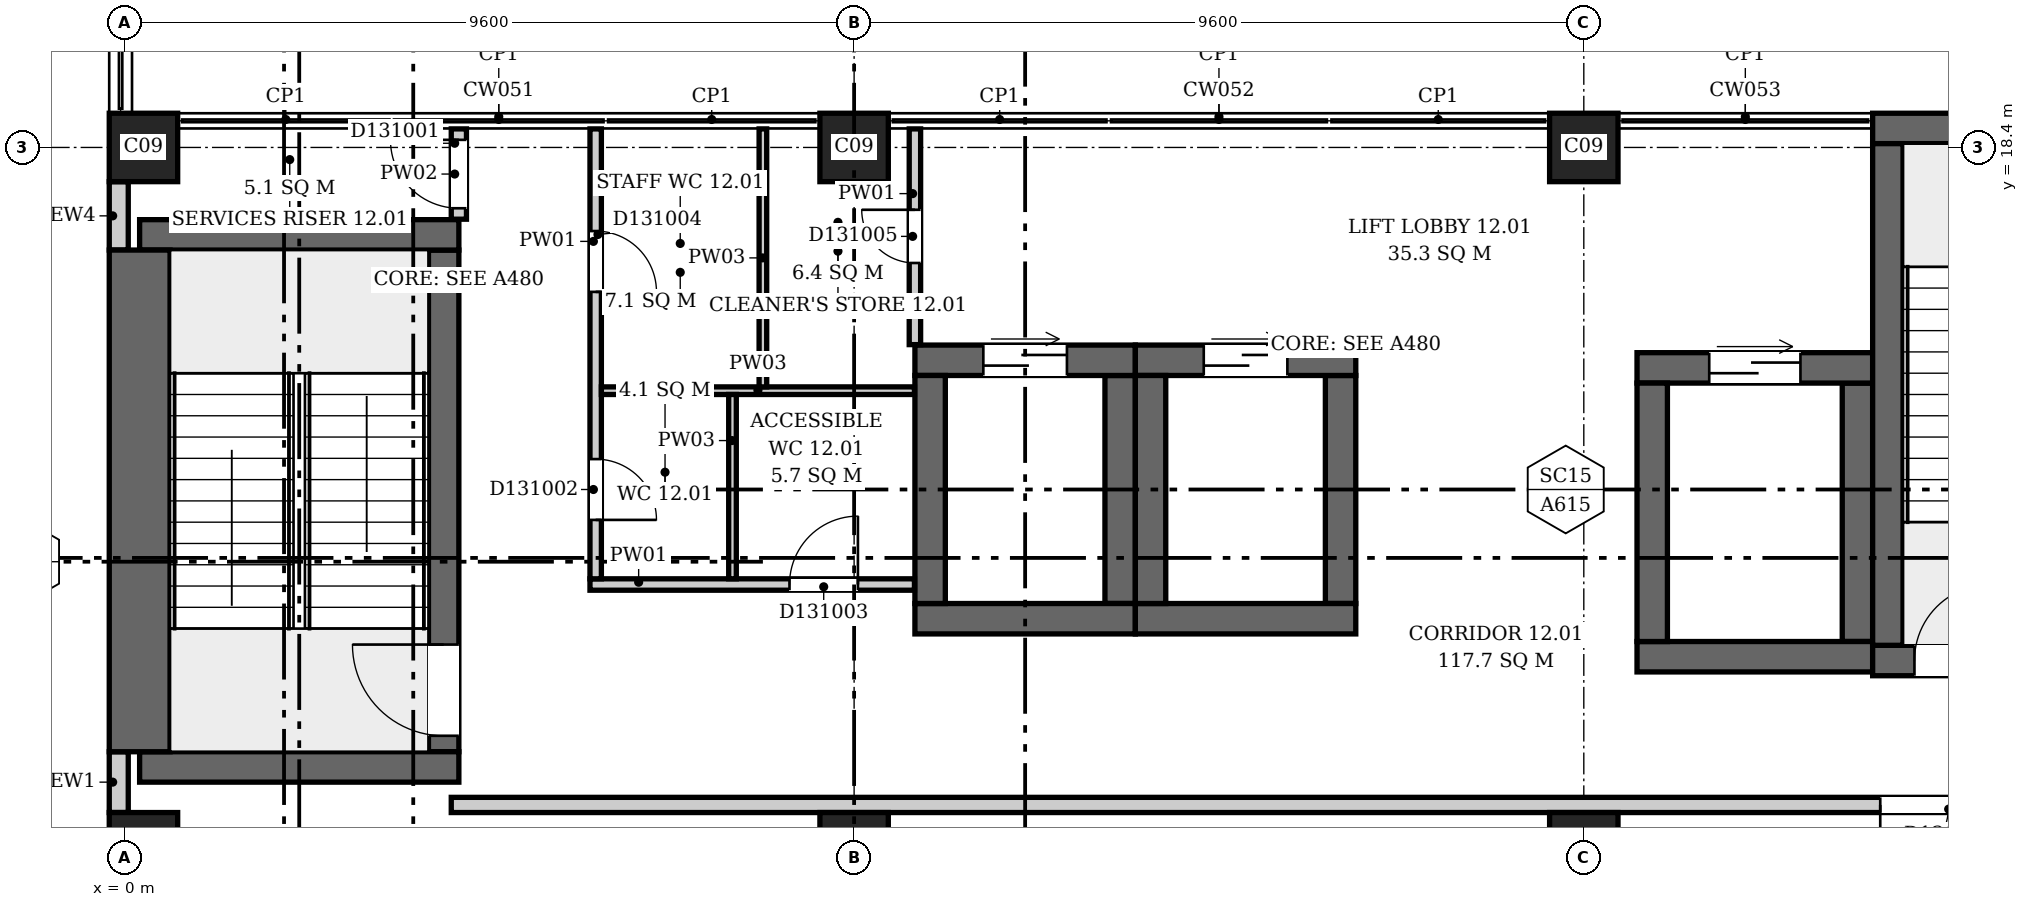
"""IFC4 building model, lengths in metres.
Left out: names, types, materials, properties, quantities, classifications, styles, units other than length and angle.
Written with IfcOpenShell. Run it as: python <this file> out.ifc"""

import sys

from ifc_helpers import new_model, si_unit, direction, frame, frame_2d, origin, origin_2d, place, context, subcontext, project, spatial, rectangle, extrude, element, fill, save


model = new_model("IFC4")
c1 = context("Model", 3, precision=1e-05, world=origin(), true_north=direction((0.0, 1.0)))
c2 = subcontext(c1, "Body", "Model", "MODEL_VIEW")
j1 = project(units=[si_unit("LENGTHUNIT", "METRE"), si_unit("PLANEANGLEUNIT", "RADIAN")], contexts=[c1])
p1 = place(None, origin())
s1 = spatial("IfcSite", under=j1, at=p1, CompositionType="ELEMENT")
p2 = place(p1, origin())
s2 = spatial("IfcBuilding", under=s1, at=p2, CompositionType="ELEMENT")
p3 = place(p2, frame((0.0, 0.0, 61.3)))
s3 = spatial("IfcBuildingStorey", under=s2, at=p3, CompositionType="ELEMENT", Elevation=61.3)
for number, where, z_axis, x_axis in (
    (1, (0.2, 10.25, 0.0), (0.0, 0.0, 1.0), (1.0, 0.0, 0.0)),
    (2, (0.2, 17.25, 0.0), (0.0, 0.0, 1.0), (1.0, 0.0, 0.0)),
):
    element("IfcWall", number, at=place(p3, frame(where, z_axis=z_axis, x_axis=x_axis)), inside=s3, PredefinedType="SHEAR", context=c2, shape_type="SweptSolid", body=[
        extrude(rectangle(XDim=4.2, YDim=0.4, at=frame_2d((2.1, 0.0))), origin(), (0.0, 0.0, 1.0), 4.2),
    ])
p4 = place(p3, frame((0.2, 10.45, 0.0), z_axis=(0.0, 0.0, 1.0), x_axis=(0.0, 1.0, 0.0)))
e3 = element("IfcWall", 3, at=p4, inside=s3, PredefinedType="SHEAR", context=c2, shape_type="SweptSolid", body=[
    extrude(rectangle(XDim=6.6, YDim=0.8, at=frame_2d((3.3, 0.0))), origin(), (0.0, 0.0, 1.0), 4.2),
])
p5 = place(p3, frame((4.2, 10.45, 0.0), z_axis=(0.0, 0.0, 1.0), x_axis=(0.0, 1.0, 0.0)))
e4 = element("IfcWall", 4, at=p5, inside=s3, PredefinedType="SHEAR", context=c2, shape_type="SweptSolid", body=[
    extrude(rectangle(XDim=6.6, YDim=0.4, at=frame_2d((3.3, 0.0))), origin(), (0.0, 0.0, 1.0), 4.2),
])
p6 = place(p5, frame((0.21, 0.0, 0.0)))
e5 = element("IfcOpeningElement", 5, at=p6, cuts=e4, PredefinedType="OPENING", context=c2, shape_type="SweptSolid", body=[
    extrude(rectangle(XDim=1.2, YDim=2.1, at=frame_2d((0.6, 1.05))), frame((0.0, 0.21, 0.0), z_axis=(0.0, -1.0, 0.0), x_axis=(1.0, 0.0, 0.0)), (0.0, 0.0, 1.0), 0.42),
])
p7 = place(p3, frame((23.0, 11.65, 0.0), z_axis=(0.0, 0.0, 1.0), x_axis=(1.0, 0.0, 0.0)))
e6 = element("IfcWall", 6, at=p7, inside=s3, PredefinedType="SHEAR", context=c2, shape_type="SweptSolid", body=[
    extrude(rectangle(XDim=4.2, YDim=0.4, at=frame_2d((2.1, 0.0))), origin(), (0.0, 0.0, 1.0), 4.2),
])
p8 = place(p7, frame((0.55, 0.0, 0.0)))
e7 = element("IfcOpeningElement", 7, at=p8, cuts=e6, PredefinedType="OPENING", context=c2, shape_type="SweptSolid", body=[
    extrude(rectangle(XDim=1.0, YDim=2.1, at=frame_2d((0.5, 1.05))), frame((0.0, 0.21, 0.0), z_axis=(0.0, -1.0, 0.0), x_axis=(1.0, 0.0, 0.0)), (0.0, 0.0, 1.0), 0.42),
])
p9 = place(p7, frame((2.65, 0.0, 0.0)))
e8 = element("IfcOpeningElement", 8, at=p9, cuts=e6, PredefinedType="OPENING", context=c2, shape_type="SweptSolid", body=[
    extrude(rectangle(XDim=1.0, YDim=2.1, at=frame_2d((0.5, 1.05))), frame((0.0, 0.21, 0.0), z_axis=(0.0, -1.0, 0.0), x_axis=(1.0, 0.0, 0.0)), (0.0, 0.0, 1.0), 0.42),
])
p10 = place(p3, frame((23.0, 18.65, 0.0), z_axis=(0.0, 0.0, 1.0), x_axis=(1.0, 0.0, 0.0)))
e9 = element("IfcWall", 9, at=p10, inside=s3, PredefinedType="SHEAR", context=c2, shape_type="SweptSolid", body=[
    extrude(rectangle(XDim=4.2, YDim=0.4, at=frame_2d((2.1, 0.0))), origin(), (0.0, 0.0, 1.0), 4.2),
])
p11 = place(p3, frame((23.2, 11.85, 0.0), z_axis=(0.0, 0.0, 1.0), x_axis=(0.0, 1.0, 0.0)))
e10 = element("IfcWall", 10, at=p11, inside=s3, PredefinedType="SHEAR", context=c2, shape_type="SweptSolid", body=[
    extrude(rectangle(XDim=6.6, YDim=0.4, at=frame_2d((3.3, 0.0))), origin(), (0.0, 0.0, 1.0), 4.2),
])
p12 = place(p3, frame((10.4, 12.2, 0.0), z_axis=(0.0, 0.0, 1.0), x_axis=(1.0, 0.0, 0.0)))
e11 = element("IfcWall", 11, at=p12, inside=s3, PredefinedType="SHEAR", context=c2, shape_type="SweptSolid", body=[
    extrude(rectangle(XDim=2.9, YDim=0.4, at=frame_2d((1.45, 0.0))), origin(), (0.0, 0.0, 1.0), 4.2),
])
p13 = place(p3, frame((10.4, 15.6, 0.0), z_axis=(0.0, 0.0, 1.0), x_axis=(1.0, 0.0, 0.0)))
e12 = element("IfcWall", 12, at=p13, inside=s3, PredefinedType="SHEAR", context=c2, shape_type="SweptSolid", body=[
    extrude(rectangle(XDim=2.9, YDim=0.4, at=frame_2d((1.45, 0.0))), origin(), (0.0, 0.0, 1.0), 4.2),
])
p14 = place(p13, frame((0.9, 0.0, 0.0)))
e13 = element("IfcOpeningElement", 13, at=p14, cuts=e12, PredefinedType="OPENING", context=c2, shape_type="SweptSolid", body=[
    extrude(rectangle(XDim=1.1, YDim=2.1, at=frame_2d((0.55, 1.05))), frame((0.0, 0.21, 0.0), z_axis=(0.0, -1.0, 0.0), x_axis=(1.0, 0.0, 0.0)), (0.0, 0.0, 1.0), 0.42),
])
for number, where, z_axis, x_axis in (
    (14, (10.6, 12.4, 0.0), (0.0, 0.0, 1.0), (0.0, 1.0, 0.0)),
    (15, (13.1, 12.4, 0.0), (0.0, 0.0, 1.0), (0.0, 1.0, 0.0)),
):
    element("IfcWall", number, at=place(p3, frame(where, z_axis=z_axis, x_axis=x_axis)), inside=s3, PredefinedType="SHEAR", context=c2, shape_type="SweptSolid", body=[
        extrude(rectangle(XDim=3.0, YDim=0.4, at=frame_2d((1.5, 0.0))), origin(), (0.0, 0.0, 1.0), 4.2),
    ])
p15 = place(p3, frame((13.3, 12.2, 0.0), z_axis=(0.0, 0.0, 1.0), x_axis=(1.0, 0.0, 0.0)))
e16 = element("IfcWall", 16, at=p15, inside=s3, PredefinedType="SHEAR", context=c2, shape_type="SweptSolid", body=[
    extrude(rectangle(XDim=2.9, YDim=0.4, at=frame_2d((1.45, 0.0))), origin(), (0.0, 0.0, 1.0), 4.2),
])
p16 = place(p3, frame((13.3, 15.6, 0.0), z_axis=(0.0, 0.0, 1.0), x_axis=(1.0, 0.0, 0.0)))
e17 = element("IfcWall", 17, at=p16, inside=s3, PredefinedType="SHEAR", context=c2, shape_type="SweptSolid", body=[
    extrude(rectangle(XDim=2.9, YDim=0.4, at=frame_2d((1.45, 0.0))), origin(), (0.0, 0.0, 1.0), 4.2),
])
p17 = place(p16, frame((0.9, 0.0, 0.0)))
e18 = element("IfcOpeningElement", 18, at=p17, cuts=e17, PredefinedType="OPENING", context=c2, shape_type="SweptSolid", body=[
    extrude(rectangle(XDim=1.1, YDim=2.1, at=frame_2d((0.55, 1.05))), frame((0.0, 0.21, 0.0), z_axis=(0.0, -1.0, 0.0), x_axis=(1.0, 0.0, 0.0)), (0.0, 0.0, 1.0), 0.42),
])
for number, where, z_axis, x_axis in (
    (19, (13.5, 12.4, 0.0), (0.0, 0.0, 1.0), (0.0, 1.0, 0.0)),
    (20, (16.0, 12.4, 0.0), (0.0, 0.0, 1.0), (0.0, 1.0, 0.0)),
):
    element("IfcWall", number, at=place(p3, frame(where, z_axis=z_axis, x_axis=x_axis)), inside=s3, PredefinedType="SHEAR", context=c2, shape_type="SweptSolid", body=[
        extrude(rectangle(XDim=3.0, YDim=0.4, at=frame_2d((1.5, 0.0))), origin(), (0.0, 0.0, 1.0), 4.2),
    ])
p18 = place(p3, frame((19.9, 11.7, 0.0), z_axis=(0.0, 0.0, 1.0), x_axis=(1.0, 0.0, 0.0)))
e21 = element("IfcWall", 21, at=p18, inside=s3, PredefinedType="SHEAR", context=c2, shape_type="SweptSolid", body=[
    extrude(rectangle(XDim=3.1, YDim=0.4, at=frame_2d((1.55, 0.0))), origin(), (0.0, 0.0, 1.0), 4.2),
])
p19 = place(p3, frame((19.9, 15.5, 0.0), z_axis=(0.0, 0.0, 1.0), x_axis=(1.0, 0.0, 0.0)))
e22 = element("IfcWall", 22, at=p19, inside=s3, PredefinedType="SHEAR", context=c2, shape_type="SweptSolid", body=[
    extrude(rectangle(XDim=3.1, YDim=0.4, at=frame_2d((1.55, 0.0))), origin(), (0.0, 0.0, 1.0), 4.2),
])
p20 = place(p19, frame((0.95, 0.0, 0.0)))
e23 = element("IfcOpeningElement", 23, at=p20, cuts=e22, PredefinedType="OPENING", context=c2, shape_type="SweptSolid", body=[
    extrude(rectangle(XDim=1.2, YDim=2.1, at=frame_2d((0.6, 1.05))), frame((0.0, 0.21, 0.0), z_axis=(0.0, -1.0, 0.0), x_axis=(1.0, 0.0, 0.0)), (0.0, 0.0, 1.0), 0.42),
])
for number, where, z_axis, x_axis in (
    (24, (20.1, 11.9, 0.0), (0.0, 0.0, 1.0), (0.0, 1.0, 0.0)),
    (25, (22.8, 11.9, 0.0), (0.0, 0.0, 1.0), (0.0, 1.0, 0.0)),
):
    element("IfcWall", number, at=place(p3, frame(where, z_axis=z_axis, x_axis=x_axis)), inside=s3, PredefinedType="SHEAR", context=c2, shape_type="SweptSolid", body=[
        extrude(rectangle(XDim=3.4, YDim=0.4, at=frame_2d((1.7, 0.0))), origin(), (0.0, 0.0, 1.0), 4.2),
    ])
for number, where, z_axis, x_axis in (
    (26, (0.25, 9.2, 0.0), (0.0, 0.0, 1.0), (1.0, 0.0, 0.0)),
    (27, (9.6, 9.2, 0.0), (0.0, 0.0, 1.0), (1.0, 0.0, 0.0)),
    (28, (19.2, 9.2, 0.0), (0.0, 0.0, 1.0), (1.0, 0.0, 0.0)),
    (29, (0.25, 18.4, 0.0), (0.0, 0.0, 1.0), (1.0, 0.0, 0.0)),
    (30, (9.6, 18.4, 0.0), (0.0, 0.0, 1.0), (1.0, 0.0, 0.0)),
    (31, (19.2, 18.4, 0.0), (0.0, 0.0, 1.0), (1.0, 0.0, 0.0)),
):
    element("IfcColumn", number, at=place(p3, frame(where, z_axis=z_axis, x_axis=x_axis)), inside=s3, PredefinedType="COLUMN", context=c2, shape_type="SweptSolid", body=[
        extrude(rectangle(XDim=0.9, YDim=0.9, at=origin_2d()), origin(), (0.0, 0.0, 1.0), 4.2),
    ])
p21 = place(p3, frame((-0.074, 10.45, 0.0), z_axis=(0.0, 0.0, 1.0), x_axis=(0.0, -1.0, 0.0)))
e32 = element("IfcWall", 32, at=p21, inside=s3, PredefinedType="ELEMENTEDWALL", context=c2, shape_type="SweptSolid", body=[
    extrude(rectangle(XDim=0.8, YDim=0.25, at=frame_2d((0.4, 0.0))), origin(), (0.0, 0.0, 1.0), 3.9),
])
p22 = place(p3, frame((-0.074, 17.95, 0.0), z_axis=(0.0, 0.0, 1.0), x_axis=(0.0, -1.0, 0.0)))
e33 = element("IfcWall", 33, at=p22, inside=s3, PredefinedType="ELEMENTEDWALL", context=c2, shape_type="SweptSolid", body=[
    extrude(rectangle(XDim=0.9, YDim=0.25, at=frame_2d((0.45, 0.0))), origin(), (0.0, 0.0, 1.0), 3.9),
])
p23 = place(p3, frame((4.3, 9.75, 0.0), z_axis=(0.0, 0.0, 1.0), x_axis=(1.0, 0.0, 0.0)))
e34 = element("IfcWall", 34, at=p23, inside=s3, PredefinedType="PARTITIONING", context=c2, shape_type="SweptSolid", body=[
    extrude(rectangle(XDim=43.894, YDim=0.2, at=frame_2d((21.947, 0.0))), origin(), (0.0, 0.0, 1.0), 3.9),
])
p24 = place(p23, frame((18.8, 0.0, 0.0)))
e35 = element("IfcOpeningElement", 35, at=p24, cuts=e34, PredefinedType="OPENING", context=c2, shape_type="SweptSolid", body=[
    extrude(rectangle(XDim=1.8, YDim=2.1, at=frame_2d((0.9, 1.05))), frame((0.0, 0.11, 0.0), z_axis=(0.0, -1.0, 0.0), x_axis=(1.0, 0.0, 0.0)), (0.0, 0.0, 1.0), 0.22),
])
p25 = place(p23, frame((28.7, 0.0, 0.0)))
e36 = element("IfcOpeningElement", 36, at=p25, cuts=e34, PredefinedType="OPENING", context=c2, shape_type="SweptSolid", body=[
    extrude(rectangle(XDim=1.2, YDim=2.1, at=frame_2d((0.6, 1.05))), frame((0.0, 0.11, 0.0), z_axis=(0.0, -1.0, 0.0), x_axis=(1.0, 0.0, 0.0)), (0.0, 0.0, 1.0), 0.22),
])
p26 = place(p23, frame((36.05, 0.0, 0.0)))
e37 = element("IfcOpeningElement", 37, at=p26, cuts=e34, PredefinedType="OPENING", context=c2, shape_type="SweptSolid", body=[
    extrude(rectangle(XDim=0.9, YDim=2.1, at=frame_2d((0.45, 1.05))), frame((0.0, 0.11, 0.0), z_axis=(0.0, -1.0, 0.0), x_axis=(1.0, 0.0, 0.0)), (0.0, 0.0, 1.0), 0.22),
])
p27 = place(p23, frame((40.8, 0.0, 0.0)))
e38 = element("IfcOpeningElement", 38, at=p27, cuts=e34, PredefinedType="OPENING", context=c2, shape_type="SweptSolid", body=[
    extrude(rectangle(XDim=1.2, YDim=2.1, at=frame_2d((0.6, 1.05))), frame((0.0, 0.11, 0.0), z_axis=(0.0, -1.0, 0.0), x_axis=(1.0, 0.0, 0.0)), (0.0, 0.0, 1.0), 0.22),
])
p28 = place(p3, frame((4.4, 17.456, 0.0), z_axis=(0.0, 0.0, 1.0), x_axis=(0.0, 1.0, 0.0)))
e39 = element("IfcWall", 39, at=p28, inside=s3, PredefinedType="PARTITIONING", context=c2, shape_type="SweptSolid", body=[
    extrude(rectangle(XDim=1.188, YDim=0.2, at=frame_2d((0.594, 0.0))), origin(), (0.0, 0.0, 1.0), 3.9),
])
p29 = place(p28, frame((0.144, 0.0, 0.0)))
e40 = element("IfcOpeningElement", 40, at=p29, cuts=e39, PredefinedType="OPENING", context=c2, shape_type="SweptSolid", body=[
    extrude(rectangle(XDim=0.9, YDim=2.1, at=frame_2d((0.45, 1.05))), frame((0.0, 0.11, 0.0), z_axis=(0.0, -1.0, 0.0), x_axis=(1.0, 0.0, 0.0)), (0.0, 0.0, 1.0), 0.22),
])
p30 = place(p3, frame((6.125, 12.65, 0.0), z_axis=(0.0, 0.0, 1.0), x_axis=(1.0, 0.0, 0.0)))
e41 = element("IfcWall", 41, at=p30, inside=s3, PredefinedType="PARTITIONING", context=c2, shape_type="SweptSolid", body=[
    extrude(rectangle(XDim=4.269, YDim=0.15, at=frame_2d((2.135, 0.0))), origin(), (0.0, 0.0, 1.0), 3.9),
])
p31 = place(p30, frame((2.625, 0.0, 0.0)))
e42 = element("IfcOpeningElement", 42, at=p31, cuts=e41, PredefinedType="OPENING", context=c2, shape_type="SweptSolid", body=[
    extrude(rectangle(XDim=0.9, YDim=2.1, at=frame_2d((0.45, 1.05))), frame((0.0, 0.085, 0.0), z_axis=(0.0, -1.0, 0.0), x_axis=(1.0, 0.0, 0.0)), (0.0, 0.0, 1.0), 0.17),
])
p32 = place(p3, frame((6.2, 12.725, 0.0), z_axis=(0.0, 0.0, 1.0), x_axis=(0.0, 1.0, 0.0)))
e43 = element("IfcWall", 43, at=p32, inside=s3, PredefinedType="PARTITIONING", context=c2, shape_type="SweptSolid", body=[
    extrude(rectangle(XDim=5.919, YDim=0.15, at=frame_2d((2.959, 0.0))), origin(), (0.0, 0.0, 1.0), 3.9),
])
p33 = place(p32, frame((0.775, 0.0, 0.0)))
e44 = element("IfcOpeningElement", 44, at=p33, cuts=e43, PredefinedType="OPENING", context=c2, shape_type="SweptSolid", body=[
    extrude(rectangle(XDim=0.8, YDim=2.1, at=frame_2d((0.4, 1.05))), frame((0.0, 0.085, 0.0), z_axis=(0.0, -1.0, 0.0), x_axis=(1.0, 0.0, 0.0)), (0.0, 0.0, 1.0), 0.17),
])
p34 = place(p32, frame((3.775, 0.0, 0.0)))
e45 = element("IfcOpeningElement", 45, at=p34, cuts=e43, PredefinedType="OPENING", context=c2, shape_type="SweptSolid", body=[
    extrude(rectangle(XDim=0.8, YDim=2.1, at=frame_2d((0.4, 1.05))), frame((0.0, 0.085, 0.0), z_axis=(0.0, -1.0, 0.0), x_axis=(1.0, 0.0, 0.0)), (0.0, 0.0, 1.0), 0.17),
])
p35 = place(p3, frame((6.275, 15.2, 0.0), z_axis=(0.0, 0.0, 1.0), x_axis=(1.0, 0.0, 0.0)))
e46 = element("IfcWall", 46, at=p35, inside=s3, PredefinedType="PARTITIONING", context=c2, shape_type="SweptSolid", body=[
    extrude(rectangle(XDim=4.119, YDim=0.1, at=frame_2d((2.06, 0.0))), origin(), (0.0, 0.0, 1.0), 3.9),
])
p36 = place(p3, frame((8.0, 12.725, 0.0), z_axis=(0.0, 0.0, 1.0), x_axis=(0.0, 1.0, 0.0)))
e47 = element("IfcWall", 47, at=p36, inside=s3, PredefinedType="PARTITIONING", context=c2, shape_type="SweptSolid", body=[
    extrude(rectangle(XDim=2.425, YDim=0.1, at=frame_2d((1.212, 0.0))), origin(), (0.0, 0.0, 1.0), 3.9),
])
p37 = place(p3, frame((8.4, 15.25, 0.0), z_axis=(0.0, 0.0, 1.0), x_axis=(0.0, 1.0, 0.0)))
e48 = element("IfcWall", 48, at=p37, inside=s3, PredefinedType="PARTITIONING", context=c2, shape_type="SweptSolid", body=[
    extrude(rectangle(XDim=3.394, YDim=0.1, at=frame_2d((1.697, 0.0))), origin(), (0.0, 0.0, 1.0), 3.9),
])
p38 = place(p3, frame((10.4, 15.806, 0.0), z_axis=(0.0, 0.0, 1.0), x_axis=(0.0, 1.0, 0.0)))
e49 = element("IfcWall", 49, at=p38, inside=s3, PredefinedType="PARTITIONING", context=c2, shape_type="SweptSolid", body=[
    extrude(rectangle(XDim=2.838, YDim=0.15, at=frame_2d((1.419, 0.0))), origin(), (0.0, 0.0, 1.0), 3.9),
])
p39 = place(p38, frame((1.074, 0.0, 0.0)))
e50 = element("IfcOpeningElement", 50, at=p39, cuts=e49, PredefinedType="OPENING", context=c2, shape_type="SweptSolid", body=[
    extrude(rectangle(XDim=0.7, YDim=2.1, at=frame_2d((0.35, 1.05))), frame((0.0, 0.085, 0.0), z_axis=(0.0, -1.0, 0.0), x_axis=(1.0, 0.0, 0.0)), (0.0, 0.0, 1.0), 0.17),
])
p40 = place(p6, origin())
e51 = element("IfcDoor", 51, at=p40, inside=s3, OperationType="SINGLE_SWING_RIGHT", PredefinedType="DOOR", context=c2, shape_type="SweptSolid", body=[
    extrude(rectangle(XDim=1.2, YDim=2.1, at=frame_2d((0.6, 1.05))), frame((0.0, 0.025, 0.0), z_axis=(0.0, -1.0, 0.0), x_axis=(1.0, 0.0, 0.0)), (0.0, 0.0, 1.0), 0.05),
])
fill(e5, e51)
p41 = place(p8, origin())
e52 = element("IfcDoor", 52, at=p41, inside=s3, OperationType="SINGLE_SWING_RIGHT", PredefinedType="DOOR", context=c2, shape_type="SweptSolid", body=[
    extrude(rectangle(XDim=1.0, YDim=2.1, at=frame_2d((0.5, 1.05))), frame((0.0, 0.025, 0.0), z_axis=(0.0, -1.0, 0.0), x_axis=(1.0, 0.0, 0.0)), (0.0, 0.0, 1.0), 0.05),
])
fill(e7, e52)
p42 = place(p14, origin())
e53 = element("IfcDoor", 53, at=p42, inside=s3, OperationType="DOUBLE_DOOR_SLIDING", PredefinedType="DOOR", context=c2, shape_type="SweptSolid", body=[
    extrude(rectangle(XDim=1.1, YDim=2.1, at=frame_2d((0.55, 1.05))), frame((0.0, 0.025, 0.0), z_axis=(0.0, -1.0, 0.0), x_axis=(1.0, 0.0, 0.0)), (0.0, 0.0, 1.0), 0.05),
])
fill(e13, e53)
p43 = place(p17, origin())
e54 = element("IfcDoor", 54, at=p43, inside=s3, OperationType="DOUBLE_DOOR_SLIDING", PredefinedType="DOOR", context=c2, shape_type="SweptSolid", body=[
    extrude(rectangle(XDim=1.1, YDim=2.1, at=frame_2d((0.55, 1.05))), frame((0.0, 0.025, 0.0), z_axis=(0.0, -1.0, 0.0), x_axis=(1.0, 0.0, 0.0)), (0.0, 0.0, 1.0), 0.05),
])
fill(e18, e54)
p44 = place(p20, origin())
e55 = element("IfcDoor", 55, at=p44, inside=s3, OperationType="DOUBLE_DOOR_SLIDING", PredefinedType="DOOR", context=c2, shape_type="SweptSolid", body=[
    extrude(rectangle(XDim=1.2, YDim=2.1, at=frame_2d((0.6, 1.05))), frame((0.0, 0.025, 0.0), z_axis=(0.0, -1.0, 0.0), x_axis=(1.0, 0.0, 0.0)), (0.0, 0.0, 1.0), 0.05),
])
fill(e23, e55)
p45 = place(p29, origin())
e56 = element("IfcDoor", 56, at=p45, inside=s3, OperationType="SINGLE_SWING_LEFT", PredefinedType="DOOR", context=c2, shape_type="SweptSolid", body=[
    extrude(rectangle(XDim=0.9, YDim=2.1, at=frame_2d((0.45, 1.05))), frame((0.0, 0.025, 0.0), z_axis=(0.0, -1.0, 0.0), x_axis=(1.0, 0.0, 0.0)), (0.0, 0.0, 1.0), 0.05),
])
fill(e40, e56)
p46 = place(p33, origin())
e57 = element("IfcDoor", 57, at=p46, inside=s3, OperationType="SINGLE_SWING_LEFT", PredefinedType="DOOR", context=c2, shape_type="SweptSolid", body=[
    extrude(rectangle(XDim=0.8, YDim=2.1, at=frame_2d((0.4, 1.05))), frame((0.0, 0.025, 0.0), z_axis=(0.0, -1.0, 0.0), x_axis=(1.0, 0.0, 0.0)), (0.0, 0.0, 1.0), 0.05),
])
fill(e44, e57)
p47 = place(p31, origin())
e58 = element("IfcDoor", 58, at=p47, inside=s3, OperationType="SINGLE_SWING_RIGHT", PredefinedType="DOOR", context=c2, shape_type="SweptSolid", body=[
    extrude(rectangle(XDim=0.9, YDim=2.1, at=frame_2d((0.45, 1.05))), frame((0.0, 0.025, 0.0), z_axis=(0.0, -1.0, 0.0), x_axis=(1.0, 0.0, 0.0)), (0.0, 0.0, 1.0), 0.05),
])
fill(e42, e58)
p48 = place(p34, origin())
e59 = element("IfcDoor", 59, at=p48, inside=s3, OperationType="SINGLE_SWING_LEFT", PredefinedType="DOOR", context=c2, shape_type="SweptSolid", body=[
    extrude(rectangle(XDim=0.8, YDim=2.1, at=frame_2d((0.4, 1.05))), frame((0.0, 0.025, 0.0), z_axis=(0.0, -1.0, 0.0), x_axis=(1.0, 0.0, 0.0)), (0.0, 0.0, 1.0), 0.05),
])
fill(e45, e59)
p49 = place(p39, origin())
e60 = element("IfcDoor", 60, at=p49, inside=s3, OperationType="SINGLE_SWING_LEFT", PredefinedType="DOOR", context=c2, shape_type="SweptSolid", body=[
    extrude(rectangle(XDim=0.7, YDim=2.1, at=frame_2d((0.35, 1.05))), frame((0.0, 0.025, 0.0), z_axis=(0.0, -1.0, 0.0), x_axis=(1.0, 0.0, 0.0)), (0.0, 0.0, 1.0), 0.05),
])
fill(e50, e60)
p50 = place(p24, origin())
e61 = element("IfcDoor", 61, at=p50, inside=s3, OperationType="DOUBLE_DOOR_SINGLE_SWING", PredefinedType="DOOR", context=c2, shape_type="SweptSolid", body=[
    extrude(rectangle(XDim=1.8, YDim=2.1, at=frame_2d((0.9, 1.05))), frame((0.0, 0.025, 0.0), z_axis=(0.0, -1.0, 0.0), x_axis=(1.0, 0.0, 0.0)), (0.0, 0.0, 1.0), 0.05),
])
fill(e35, e61)
save(model, sys.argv[1])
